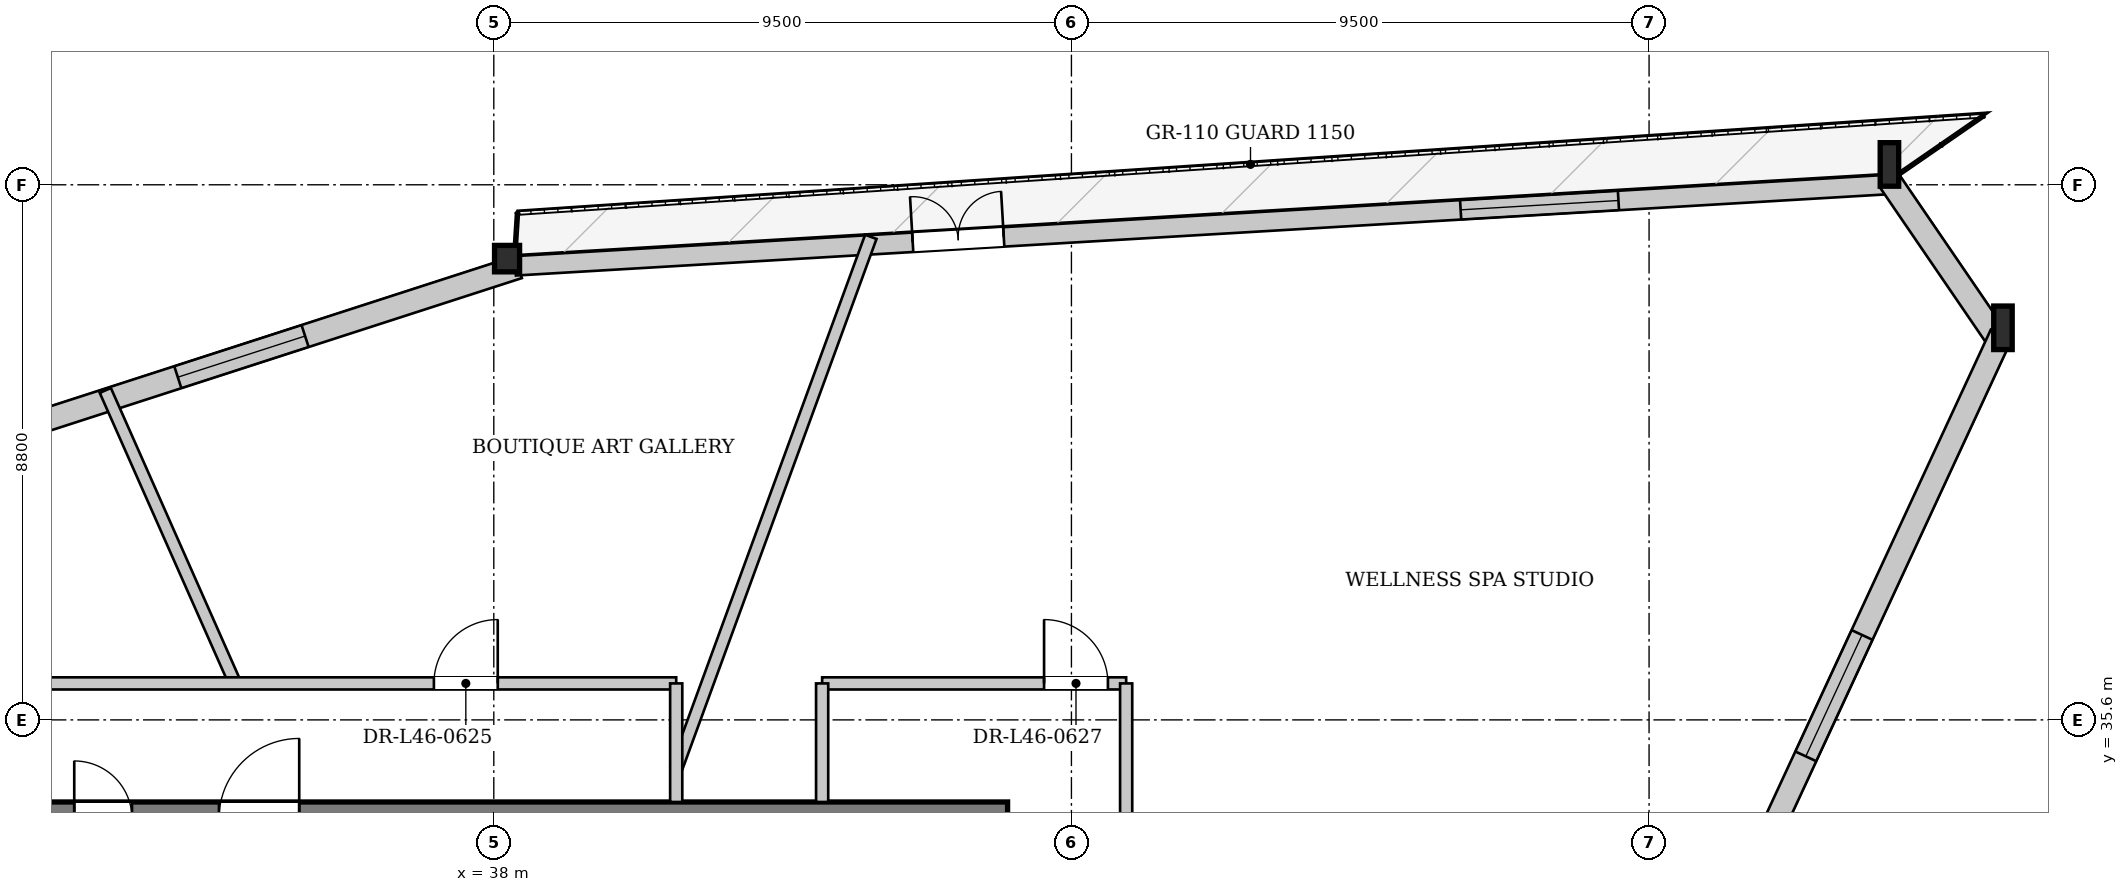
"""IFC4 building model, lengths in metres.
Left out: names, types, materials, properties, quantities, classifications, styles, units other than length and angle.
Written with IfcOpenShell. Run it as: python <this file> out.ifc"""

import sys

from ifc_helpers import new_model, si_unit, direction, frame, frame_2d, origin, origin_2d, place, context, subcontext, project, spatial, rectangle, i_section, extrude, source, transform, mapped, element, fill, save


model = new_model("IFC4")
c1 = context("Model", 3, precision=1e-05, world=origin(), true_north=direction((0.0, 1.0)))
c2 = subcontext(c1, "Body", "Model", "MODEL_VIEW")
j1 = project(units=[si_unit("LENGTHUNIT", "METRE"), si_unit("PLANEANGLEUNIT", "RADIAN")], contexts=[c1])
p1 = place(None, origin())
s1 = spatial("IfcSite", under=j1, at=p1, CompositionType="ELEMENT")
p2 = place(p1, origin())
s2 = spatial("IfcBuilding", under=s1, at=p2, CompositionType="ELEMENT")
p3 = place(p2, frame((0.0, 0.0, 175.0)))
s3 = spatial("IfcBuildingStorey", under=s2, at=p3, CompositionType="ELEMENT", Elevation=175.0)
m1 = source(origin(), c2, "Body", "SweptSolid", [
    extrude(i_section(OverallWidth=0.304, OverallDepth=0.716, WebThickness=0.021, FlangeThickness=0.04, at=origin_2d()), origin(), (0.0, 0.0, 1.0), 3.419),
])
p4 = place(p3, frame((62.965, 41.858, 0.0), z_axis=(-0.084770266096, 0.111194022166, 0.99017669707), x_axis=(-0.795255814538, -0.606274021745, 0.0)))
e1 = element("IfcColumn", 1, at=p4, inside=s3, PredefinedType="COLUMN", context=c2, shape_type="MappedRepresentation", body=[
    mapped(m1, transform((0.0, 0.0, 0.0), x_axis=(1.0, 0.0, 0.0), y_axis=(0.0, 1.0, 0.0), z_axis=(0.0, 0.0, 1.0), scale=1.0)),
])
m2 = source(origin(), c2, "Body", "SweptSolid", [
    extrude(i_section(OverallWidth=0.304, OverallDepth=0.716, WebThickness=0.021, FlangeThickness=0.04, at=origin_2d()), origin(), (0.0, 0.0, 1.0), 3.414),
])
p5 = place(p3, frame((61.108, 44.575, 0.0), z_axis=(-0.090815817795, 0.093533141477, 0.991465601362), x_axis=(-0.717451675524, -0.696608278223, 0.0)))
e2 = element("IfcColumn", 2, at=p5, inside=s3, PredefinedType="COLUMN", context=c2, shape_type="MappedRepresentation", body=[
    mapped(m2, transform((0.0, 0.0, 0.0), x_axis=(1.0, 0.0, 0.0), y_axis=(0.0, 1.0, 0.0), z_axis=(0.0, 0.0, 1.0), scale=1.0)),
])
m3 = source(origin(), c2, "Body", "SweptSolid", [
    extrude(i_section(OverallWidth=0.412, OverallDepth=0.435, WebThickness=0.031, FlangeThickness=0.05, at=origin_2d()), origin(), (0.0, 0.0, 1.0), 3.396),
])
p6 = place(p3, frame((38.344, 43.227, 0.0), z_axis=(-0.074419158204, -0.024374970658, 0.996929109665), x_axis=(0.311265239692, -0.950323076937, 0.0)))
e3 = element("IfcColumn", 3, at=p6, inside=s3, PredefinedType="COLUMN", context=c2, shape_type="MappedRepresentation", body=[
    mapped(m3, transform((0.0, 0.0, 0.0), x_axis=(1.0, 0.0, 0.0), y_axis=(0.0, 1.0, 0.0), z_axis=(0.0, 0.0, 1.0), scale=1.0)),
])
p7 = place(p3, frame((16.706, 36.031, 0.0), z_axis=(0.0, 0.0, 1.0), x_axis=(0.95149688804, 0.307658369056, 0.0)))
e4 = element("IfcWall", 4, at=p7, inside=s3, PredefinedType="SOLIDWALL", context=c2, shape_type="SweptSolid", body=[
    extrude(rectangle(XDim=22.803, YDim=0.38, at=frame_2d((11.402, 0.0))), origin(), (0.0, 0.0, 1.0), 2.722),
])
p8 = place(p7, frame((5.285, 0.0, 0.352)))
e5 = element("IfcOpeningElement", 5, at=p8, cuts=e4, PredefinedType="OPENING", context=c2, shape_type="SweptSolid", body=[
    extrude(rectangle(XDim=2.2, YDim=2.25, at=frame_2d((1.1, 1.125))), frame((0.0, 0.2, 0.0), z_axis=(0.0, -1.0, 0.0), x_axis=(1.0, 0.0, 0.0)), (0.0, 0.0, 1.0), 0.4),
])
p9 = place(p7, frame((16.918, 0.0, 0.352)))
e6 = element("IfcOpeningElement", 6, at=p9, cuts=e4, PredefinedType="OPENING", context=c2, shape_type="SweptSolid", body=[
    extrude(rectangle(XDim=2.2, YDim=2.25, at=frame_2d((1.1, 1.125))), frame((0.0, 0.2, 0.0), z_axis=(0.0, -1.0, 0.0), x_axis=(1.0, 0.0, 0.0)), (0.0, 0.0, 1.0), 0.4),
])
p10 = place(p3, frame((38.354, 43.067, 0.0), z_axis=(0.0, 0.0, 1.0), x_axis=(0.998252151259, 0.059098582957, 0.0)))
e7 = element("IfcWall", 7, at=p10, inside=s3, PredefinedType="SOLIDWALL", context=c2, shape_type="SweptSolid", body=[
    extrude(rectangle(XDim=22.803, YDim=0.32, at=frame_2d((11.402, 0.0))), origin(), (0.0, 0.0, 1.0), 2.722),
])
p11 = place(p10, frame((6.547, 0.0, 0.0)))
e8 = element("IfcOpeningElement", 8, at=p11, cuts=e7, PredefinedType="OPENING", context=c2, shape_type="SweptSolid", body=[
    extrude(rectangle(XDim=1.5, YDim=2.3, at=frame_2d((0.75, 1.15))), frame((0.0, 0.17, 0.0), z_axis=(0.0, -1.0, 0.0), x_axis=(1.0, 0.0, 0.0)), (0.0, 0.0, 1.0), 0.34),
])
p12 = place(p10, frame((15.574, 0.0, 0.252)))
e9 = element("IfcOpeningElement", 9, at=p12, cuts=e7, PredefinedType="OPENING", context=c2, shape_type="SweptSolid", body=[
    extrude(rectangle(XDim=2.6, YDim=2.35, at=frame_2d((1.3, 1.175))), frame((0.0, 0.17, 0.0), z_axis=(0.0, -1.0, 0.0), x_axis=(1.0, 0.0, 0.0)), (0.0, 0.0, 1.0), 0.34),
])
p13 = place(p3, frame((60.951, 44.468, 0.0), z_axis=(0.0, 0.0, 1.0), x_axis=(0.564284906386, -0.825580125987, 0.0)))
e10 = element("IfcWall", 10, at=p13, inside=s3, PredefinedType="SOLIDWALL", context=c2, shape_type="SweptSolid", body=[
    extrude(rectangle(XDim=3.291, YDim=0.38, at=frame_2d((1.646, 0.0))), origin(), (0.0, 0.0, 1.0), 2.722),
])
p14 = place(p3, frame((62.792, 41.938, 0.0), z_axis=(0.0, 0.0, 1.0), x_axis=(-0.420482819505, -0.907300500662, 0.0)))
e11 = element("IfcWall", 11, at=p14, inside=s3, PredefinedType="SOLIDWALL", context=c2, shape_type="SweptSolid", body=[
    extrude(rectangle(XDim=23.378, YDim=0.38, at=frame_2d((11.689, 0.0))), origin(), (0.0, 0.0, 1.0), 2.722),
])
p15 = place(p14, frame((5.446, 0.0, 0.352)))
e12 = element("IfcOpeningElement", 12, at=p15, cuts=e11, PredefinedType="OPENING", context=c2, shape_type="SweptSolid", body=[
    extrude(rectangle(XDim=2.2, YDim=2.25, at=frame_2d((1.1, 1.125))), frame((0.0, 0.2, 0.0), z_axis=(0.0, -1.0, 0.0), x_axis=(1.0, 0.0, 0.0)), (0.0, 0.0, 1.0), 0.4),
])
p16 = place(p14, frame((15.732, 0.0, 0.352)))
e13 = element("IfcOpeningElement", 13, at=p16, cuts=e11, PredefinedType="OPENING", context=c2, shape_type="SweptSolid", body=[
    extrude(rectangle(XDim=2.2, YDim=2.25, at=frame_2d((1.1, 1.125))), frame((0.0, 0.2, 0.0), z_axis=(0.0, -1.0, 0.0), x_axis=(1.0, 0.0, 0.0)), (0.0, 0.0, 1.0), 0.4),
])
p17 = place(p3, frame((29.55, 33.975, 0.0), z_axis=(0.0, 0.0, 1.0), x_axis=(1.0, 0.0, 0.0)))
e14 = element("IfcWall", 14, at=p17, inside=s3, PredefinedType="SHEAR", context=c2, shape_type="SweptSolid", body=[
    extrude(rectangle(XDim=16.9, YDim=0.55, at=frame_2d((8.45, 0.0))), origin(), (0.0, 0.0, 1.0), 3.33),
])
p18 = place(p17, frame((1.55, 0.0, 0.0)))
e15 = element("IfcOpeningElement", 15, at=p18, cuts=e14, PredefinedType="OPENING", context=c2, shape_type="SweptSolid", body=[
    extrude(rectangle(XDim=0.95, YDim=2.1, at=frame_2d((0.475, 1.05))), frame((0.0, 0.285, 0.0), z_axis=(0.0, -1.0, 0.0), x_axis=(1.0, 0.0, 0.0)), (0.0, 0.0, 1.0), 0.57),
])
p19 = place(p17, frame((3.93, 0.0, 0.0)))
e16 = element("IfcOpeningElement", 16, at=p19, cuts=e14, PredefinedType="OPENING", context=c2, shape_type="SweptSolid", body=[
    extrude(rectangle(XDim=1.32, YDim=2.2, at=frame_2d((0.66, 1.1))), frame((0.0, 0.285, 0.0), z_axis=(0.0, -1.0, 0.0), x_axis=(1.0, 0.0, 0.0)), (0.0, 0.0, 1.0), 0.57),
])
p20 = place(p3, frame((41.0, 34.798, 0.0), z_axis=(0.0, 0.0, 1.0), x_axis=(0.343651455117, 0.939097267271, 0.0)))
e17 = element("IfcWall", 17, at=p20, inside=s3, PredefinedType="PARTITIONING", context=c2, shape_type="SweptSolid", body=[
    extrude(rectangle(XDim=9.313, YDim=0.2, at=frame_2d((4.656, 0.0))), origin(), (0.0, 0.0, 1.0), 3.33),
])
p21 = place(p3, frame((33.746, 36.2, 0.0), z_axis=(0.0, 0.0, 1.0), x_axis=(-0.40512810206, 0.914259930721, 0.0)))
e18 = element("IfcWall", 18, at=p21, inside=s3, PredefinedType="PARTITIONING", context=c2, shape_type="SweptSolid", body=[
    extrude(rectangle(XDim=5.27, YDim=0.2, at=frame_2d((2.635, 0.0))), origin(), (0.0, 0.0, 1.0), 3.33),
])
p22 = place(p3, frame((27.6, 36.2, 0.0), z_axis=(0.0, 0.0, 1.0), x_axis=(1.0, 0.0, 0.0)))
e19 = element("IfcWall", 19, at=p22, inside=s3, PredefinedType="PARTITIONING", context=c2, shape_type="SweptSolid", body=[
    extrude(rectangle(XDim=13.4, YDim=0.2, at=frame_2d((6.7, 0.0))), origin(), (0.0, 0.0, 1.0), 3.33),
])
p23 = place(p22, frame((9.415, 0.0, 0.0)))
e20 = element("IfcOpeningElement", 20, at=p23, cuts=e19, PredefinedType="OPENING", context=c2, shape_type="SweptSolid", body=[
    extrude(rectangle(XDim=1.05, YDim=2.2, at=frame_2d((0.525, 1.1))), frame((0.0, 0.11, 0.0), z_axis=(0.0, -1.0, 0.0), x_axis=(1.0, 0.0, 0.0)), (0.0, 0.0, 1.0), 0.22),
])
p24 = place(p22, frame((1.929, 0.0, 0.0)))
e21 = element("IfcOpeningElement", 21, at=p24, cuts=e19, PredefinedType="OPENING", context=c2, shape_type="SweptSolid", body=[
    extrude(rectangle(XDim=1.05, YDim=2.2, at=frame_2d((0.525, 1.1))), frame((0.0, 0.11, 0.0), z_axis=(0.0, -1.0, 0.0), x_axis=(1.0, 0.0, 0.0)), (0.0, 0.0, 1.0), 0.22),
])
p25 = place(p3, frame((41.0, 34.25, 0.0), z_axis=(0.0, 0.0, 1.0), x_axis=(0.0, 1.0, 0.0)))
e22 = element("IfcWall", 22, at=p25, inside=s3, PredefinedType="PARTITIONING", context=c2, shape_type="SweptSolid", body=[
    extrude(rectangle(XDim=1.95, YDim=0.2, at=frame_2d((0.975, 0.0))), origin(), (0.0, 0.0, 1.0), 3.33),
])
p26 = place(p3, frame((43.4, 36.2, 0.0), z_axis=(0.0, 0.0, 1.0), x_axis=(1.0, 0.0, 0.0)))
e23 = element("IfcWall", 23, at=p26, inside=s3, PredefinedType="PARTITIONING", context=c2, shape_type="SweptSolid", body=[
    extrude(rectangle(XDim=5.0, YDim=0.2, at=frame_2d((2.5, 0.0))), origin(), (0.0, 0.0, 1.0), 3.33),
])
p27 = place(p26, frame((3.65, 0.0, 0.0)))
e24 = element("IfcOpeningElement", 24, at=p27, cuts=e23, PredefinedType="OPENING", context=c2, shape_type="SweptSolid", body=[
    extrude(rectangle(XDim=1.05, YDim=2.2, at=frame_2d((0.525, 1.1))), frame((0.0, 0.11, 0.0), z_axis=(0.0, -1.0, 0.0), x_axis=(1.0, 0.0, 0.0)), (0.0, 0.0, 1.0), 0.22),
])
p28 = place(p3, frame((43.4, 34.25, 0.0), z_axis=(0.0, 0.0, 1.0), x_axis=(0.0, 1.0, 0.0)))
e25 = element("IfcWall", 25, at=p28, inside=s3, PredefinedType="PARTITIONING", context=c2, shape_type="SweptSolid", body=[
    extrude(rectangle(XDim=1.95, YDim=0.2, at=frame_2d((0.975, 0.0))), origin(), (0.0, 0.0, 1.0), 3.33),
])
p29 = place(p3, frame((48.4, 17.0, 0.0), z_axis=(0.0, 0.0, 1.0), x_axis=(0.0, 1.0, 0.0)))
e26 = element("IfcWall", 26, at=p29, inside=s3, PredefinedType="PARTITIONING", context=c2, shape_type="SweptSolid", body=[
    extrude(rectangle(XDim=19.2, YDim=0.2, at=frame_2d((9.6, 0.0))), origin(), (0.0, 0.0, 1.0), 3.33),
])
p30 = place(p29, frame((8.849, 0.0, 0.0)))
e27 = element("IfcOpeningElement", 27, at=p30, cuts=e26, PredefinedType="OPENING", context=c2, shape_type="SweptSolid", body=[
    extrude(rectangle(XDim=1.05, YDim=2.2, at=frame_2d((0.525, 1.1))), frame((0.0, 0.11, 0.0), z_axis=(0.0, -1.0, 0.0), x_axis=(1.0, 0.0, 0.0)), (0.0, 0.0, 1.0), 0.22),
])
m4 = source(origin(), c2, "Body", "SweptSolid", [
    extrude(rectangle(XDim=2.2, YDim=2.25, at=frame_2d((1.1, 1.125))), frame((0.0, 0.03, 0.0), z_axis=(0.0, -1.0, 0.0), x_axis=(1.0, 0.0, 0.0)), (0.0, 0.0, 1.0), 0.06),
])
p31 = place(p9, origin())
e28 = element("IfcWindow", 28, at=p31, inside=s3, PartitioningType="SINGLE_PANEL", PredefinedType="WINDOW", context=c2, shape_type="MappedRepresentation", body=[
    mapped(m4, transform((0.0, 0.0, 0.0), x_axis=(1.0, 0.0, 0.0), y_axis=(0.0, 1.0, 0.0), z_axis=(0.0, 0.0, 1.0), scale=1.0)),
])
fill(e6, e28)
m5 = source(origin(), c2, "Body", "SweptSolid", [
    extrude(rectangle(XDim=1.5, YDim=2.3, at=frame_2d((0.75, 1.15))), frame((0.0, 0.025, 0.0), z_axis=(0.0, -1.0, 0.0), x_axis=(1.0, 0.0, 0.0)), (0.0, 0.0, 1.0), 0.05),
])
p32 = place(p11, origin())
e29 = element("IfcDoor", 29, at=p32, inside=s3, OperationType="DOUBLE_DOOR_SINGLE_SWING", PredefinedType="DOOR", context=c2, shape_type="MappedRepresentation", body=[
    mapped(m5, transform((0.0, 0.0, 0.0), x_axis=(1.0, 0.0, 0.0), y_axis=(0.0, 1.0, 0.0), z_axis=(0.0, 0.0, 1.0), scale=1.0)),
])
fill(e8, e29)
m6 = source(origin(), c2, "Body", "SweptSolid", [
    extrude(rectangle(XDim=2.6, YDim=2.35, at=frame_2d((1.3, 1.175))), frame((0.0, 0.03, 0.0), z_axis=(0.0, -1.0, 0.0), x_axis=(1.0, 0.0, 0.0)), (0.0, 0.0, 1.0), 0.06),
])
p33 = place(p12, origin())
e30 = element("IfcWindow", 30, at=p33, inside=s3, PartitioningType="SINGLE_PANEL", PredefinedType="WINDOW", context=c2, shape_type="MappedRepresentation", body=[
    mapped(m6, transform((0.0, 0.0, 0.0), x_axis=(1.0, 0.0, 0.0), y_axis=(0.0, 1.0, 0.0), z_axis=(0.0, 0.0, 1.0), scale=1.0)),
])
fill(e9, e30)
p34 = place(p15, origin())
e31 = element("IfcWindow", 31, at=p34, inside=s3, PartitioningType="SINGLE_PANEL", PredefinedType="WINDOW", context=c2, shape_type="MappedRepresentation", body=[
    mapped(m4, transform((0.0, 0.0, 0.0), x_axis=(1.0, 0.0, 0.0), y_axis=(0.0, 1.0, 0.0), z_axis=(0.0, 0.0, 1.0), scale=1.0)),
])
fill(e12, e31)
m7 = source(origin(), c2, "Body", "SweptSolid", [
    extrude(rectangle(XDim=1.05, YDim=2.2, at=frame_2d((0.525, 1.1))), frame((0.0, 0.025, 0.0), z_axis=(0.0, -1.0, 0.0), x_axis=(1.0, 0.0, 0.0)), (0.0, 0.0, 1.0), 0.05),
])
p35 = place(p23, origin())
e32 = element("IfcDoor", 32, at=p35, inside=s3, OperationType="SINGLE_SWING_RIGHT", PredefinedType="DOOR", context=c2, shape_type="MappedRepresentation", body=[
    mapped(m7, transform((0.0, 0.0, 0.0), x_axis=(1.0, 0.0, 0.0), y_axis=(0.0, 1.0, 0.0), z_axis=(0.0, 0.0, 1.0), scale=1.0)),
])
fill(e20, e32)
p36 = place(p27, origin())
e33 = element("IfcDoor", 33, at=p36, inside=s3, OperationType="SINGLE_SWING_LEFT", PredefinedType="DOOR", context=c2, shape_type="MappedRepresentation", body=[
    mapped(m7, transform((0.0, 0.0, 0.0), x_axis=(1.0, 0.0, 0.0), y_axis=(0.0, 1.0, 0.0), z_axis=(0.0, 0.0, 1.0), scale=1.0)),
])
fill(e24, e33)
save(model, sys.argv[1])
